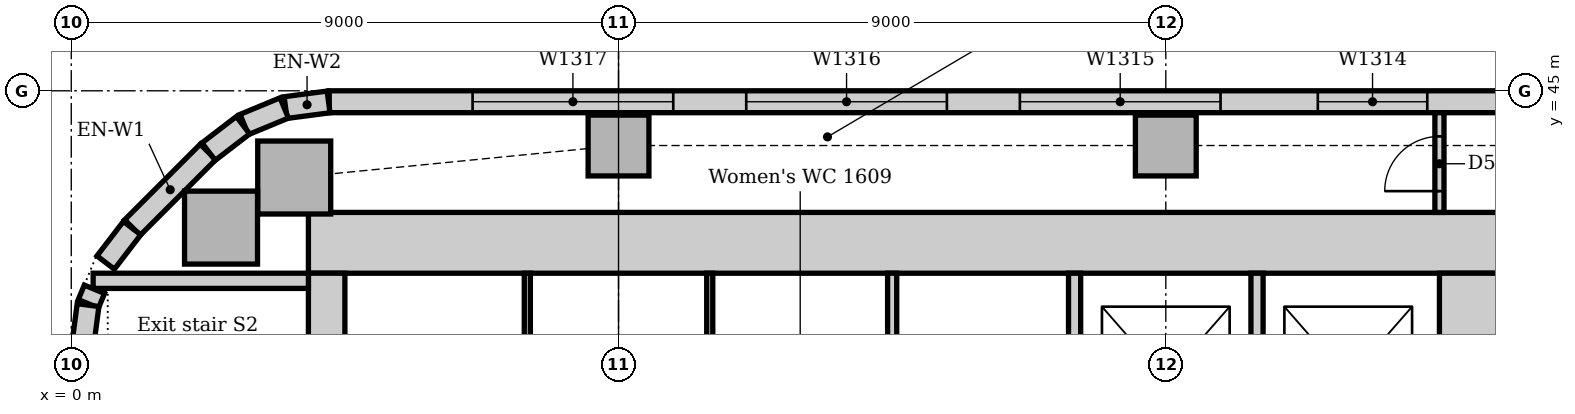
"""IFC4 building model, lengths in metres.
Left out: names, types, materials, properties, quantities, classifications, styles, units other than length and angle.
Written with IfcOpenShell. Run it as: python <this file> out.ifc"""

import sys

from ifc_helpers import new_model, si_unit, direction, frame, frame_2d, origin, origin_2d, place, context, subcontext, project, spatial, rectangle, extrude, element, fill, save


model = new_model("IFC4")
c1 = context("Model", 3, precision=1e-05, world=origin(), true_north=direction((0.0, 1.0)))
c2 = subcontext(c1, "Body", "Model", "MODEL_VIEW")
j1 = project(units=[si_unit("LENGTHUNIT", "METRE"), si_unit("PLANEANGLEUNIT", "RADIAN")], contexts=[c1])
p1 = place(None, origin())
s1 = spatial("IfcSite", under=j1, at=p1, CompositionType="ELEMENT")
p2 = place(p1, origin())
s2 = spatial("IfcBuilding", under=s1, at=p2, CompositionType="ELEMENT")
p3 = place(p2, frame((0.0, 0.0, 71.0)))
s3 = spatial("IfcBuildingStorey", under=s2, at=p3, CompositionType="ELEMENT", Elevation=71.0)
p4 = place(p3, frame((23.5, 42.5, 0.0), z_axis=(0.0, 0.0, 1.0), x_axis=(-1.0, 0.0, 0.0)))
e1 = element("IfcWall", 1, at=p4, inside=s3, PredefinedType="SOLIDWALL", context=c2, shape_type="SweptSolid", body=[
    extrude(rectangle(XDim=19.6, YDim=1.0, at=frame_2d((9.8, 0.0))), origin(), (0.0, 0.0, 1.0), 4.0),
])
p5 = place(p3, frame((23.0, 31.5, 0.0), z_axis=(0.0, 0.0, 1.0), x_axis=(0.0, 1.0, 0.0)))
e2 = element("IfcWall", 2, at=p5, inside=s3, PredefinedType="SOLIDWALL", context=c2, shape_type="SweptSolid", body=[
    extrude(rectangle(XDim=10.5, YDim=1.0, at=frame_2d((5.25, 0.0))), origin(), (0.0, 0.0, 1.0), 4.0),
])
p6 = place(p5, frame((3.15, 0.0, 0.0)))
e3 = element("IfcOpeningElement", 3, at=p6, cuts=e2, PredefinedType="OPENING", context=c2, shape_type="SweptSolid", body=[
    extrude(rectangle(XDim=1.0, YDim=2.1, at=frame_2d((0.5, 1.05))), frame((0.0, 0.51, 0.0), z_axis=(0.0, -1.0, 0.0), x_axis=(1.0, 0.0, 0.0)), (0.0, 0.0, 1.0), 1.02),
])
p7 = place(p5, frame((5.2, 0.0, 0.0)))
e4 = element("IfcOpeningElement", 4, at=p7, cuts=e2, PredefinedType="OPENING", context=c2, shape_type="SweptSolid", body=[
    extrude(rectangle(XDim=1.0, YDim=2.1, at=frame_2d((0.5, 1.05))), frame((0.0, 0.51, 0.0), z_axis=(0.0, -1.0, 0.0), x_axis=(1.0, 0.0, 0.0)), (0.0, 0.0, 1.0), 1.02),
])
p8 = place(p3, frame((4.2, 42.0, 0.0), z_axis=(0.0, 0.0, 1.0), x_axis=(0.0, -1.0, 0.0)))
e5 = element("IfcWall", 5, at=p8, inside=s3, PredefinedType="SOLIDWALL", context=c2, shape_type="SweptSolid", body=[
    extrude(rectangle(XDim=10.5, YDim=0.6, at=frame_2d((5.25, 0.0))), origin(), (0.0, 0.0, 1.0), 4.0),
])
p9 = place(p8, frame((5.3, 0.0, 0.0)))
e6 = element("IfcOpeningElement", 6, at=p9, cuts=e5, PredefinedType="OPENING", context=c2, shape_type="SweptSolid", body=[
    extrude(rectangle(XDim=1.0, YDim=2.1, at=frame_2d((0.5, 1.05))), frame((0.0, 0.31, 0.0), z_axis=(0.0, -1.0, 0.0), x_axis=(1.0, 0.0, 0.0)), (0.0, 0.0, 1.0), 0.62),
])
p10 = place(p3, frame((3.9, 41.875, 0.0), z_axis=(0.0, 0.0, 1.0), x_axis=(-1.0, 0.0, 0.0)))
e7 = element("IfcWall", 7, at=p10, inside=s3, PredefinedType="SOLIDWALL", context=c2, shape_type="SweptSolid", body=[
    extrude(rectangle(XDim=3.54, YDim=0.25, at=frame_2d((1.77, 0.0))), origin(), (0.0, 0.0, 1.0), 4.0),
])
for number, where, z_axis, x_axis in (
    (8, (3.667, 43.574, 0.0), (0.0, 0.0, 1.0), (1.0, 0.0, 0.0)),
    (9, (2.463, 42.75, 0.0), (0.0, 0.0, 1.0), (1.0, 0.0, 0.0)),
):
    element("IfcColumn", number, at=place(p3, frame(where, z_axis=z_axis, x_axis=x_axis)), inside=s3, PredefinedType="COLUMN", context=c2, shape_type="SweptSolid", body=[
        extrude(rectangle(XDim=1.2, YDim=1.2, at=origin_2d()), origin(), (0.0, 0.0, 1.0), 3.85),
    ])
for number, where, z_axis, x_axis in (
    (10, (9.0, 44.1, 0.0), (0.0, 0.0, 1.0), (1.0, 0.0, 0.0)),
    (11, (18.0, 44.1, 0.0), (0.0, 0.0, 1.0), (1.0, 0.0, 0.0)),
):
    element("IfcColumn", number, at=place(p3, frame(where, z_axis=z_axis, x_axis=x_axis)), inside=s3, PredefinedType="COLUMN", context=c2, shape_type="SweptSolid", body=[
        extrude(rectangle(XDim=1.0, YDim=1.0, at=origin_2d()), origin(), (0.0, 0.0, 1.0), 3.85),
    ])
p11 = place(p3, frame((48.257, 44.82, 0.0), z_axis=(0.0, 0.0, 1.0), x_axis=(-1.0, 0.0, 0.0)))
e12 = element("IfcWall", 12, at=p11, inside=s3, PredefinedType="STANDARD", context=c2, shape_type="SweptSolid", body=[
    extrude(rectangle(XDim=44.015, YDim=0.36, at=frame_2d((22.007, 0.0))), origin(), (0.0, 0.0, 1.0), 3.85),
])
p12 = place(p11, frame((2.057, 0.0, 0.9)))
e13 = element("IfcOpeningElement", 13, at=p12, cuts=e12, PredefinedType="OPENING", context=c2, shape_type="SweptSolid", body=[
    extrude(rectangle(XDim=3.3, YDim=1.6, at=frame_2d((1.65, 0.8))), frame((0.0, 0.19, 0.0), z_axis=(0.0, -1.0, 0.0), x_axis=(1.0, 0.0, 0.0)), (0.0, 0.0, 1.0), 0.38),
])
p13 = place(p11, frame((6.857, 0.0, 0.9)))
e14 = element("IfcOpeningElement", 14, at=p13, cuts=e12, PredefinedType="OPENING", context=c2, shape_type="SweptSolid", body=[
    extrude(rectangle(XDim=3.3, YDim=1.6, at=frame_2d((1.65, 0.8))), frame((0.0, 0.19, 0.0), z_axis=(0.0, -1.0, 0.0), x_axis=(1.0, 0.0, 0.0)), (0.0, 0.0, 1.0), 0.38),
])
p14 = place(p11, frame((11.357, 0.0, 0.9)))
e15 = element("IfcOpeningElement", 15, at=p14, cuts=e12, PredefinedType="OPENING", context=c2, shape_type="SweptSolid", body=[
    extrude(rectangle(XDim=3.3, YDim=1.6, at=frame_2d((1.65, 0.8))), frame((0.0, 0.19, 0.0), z_axis=(0.0, -1.0, 0.0), x_axis=(1.0, 0.0, 0.0)), (0.0, 0.0, 1.0), 0.38),
])
p15 = place(p11, frame((15.857, 0.0, 0.9)))
e16 = element("IfcOpeningElement", 16, at=p15, cuts=e12, PredefinedType="OPENING", context=c2, shape_type="SweptSolid", body=[
    extrude(rectangle(XDim=3.3, YDim=1.6, at=frame_2d((1.65, 0.8))), frame((0.0, 0.19, 0.0), z_axis=(0.0, -1.0, 0.0), x_axis=(1.0, 0.0, 0.0)), (0.0, 0.0, 1.0), 0.38),
])
p16 = place(p11, frame((20.357, 0.0, 0.9)))
e17 = element("IfcOpeningElement", 17, at=p16, cuts=e12, PredefinedType="OPENING", context=c2, shape_type="SweptSolid", body=[
    extrude(rectangle(XDim=3.3, YDim=1.6, at=frame_2d((1.65, 0.8))), frame((0.0, 0.19, 0.0), z_axis=(0.0, -1.0, 0.0), x_axis=(1.0, 0.0, 0.0)), (0.0, 0.0, 1.0), 0.38),
])
p17 = place(p11, frame((25.957, 0.0, 0.9)))
e18 = element("IfcOpeningElement", 18, at=p17, cuts=e12, PredefinedType="OPENING", context=c2, shape_type="SweptSolid", body=[
    extrude(rectangle(XDim=1.8, YDim=1.6, at=frame_2d((0.9, 0.8))), frame((0.0, 0.19, 0.0), z_axis=(0.0, -1.0, 0.0), x_axis=(1.0, 0.0, 0.0)), (0.0, 0.0, 1.0), 0.38),
])
p18 = place(p11, frame((29.357, 0.0, 0.9)))
e19 = element("IfcOpeningElement", 19, at=p18, cuts=e12, PredefinedType="OPENING", context=c2, shape_type="SweptSolid", body=[
    extrude(rectangle(XDim=3.3, YDim=1.6, at=frame_2d((1.65, 0.8))), frame((0.0, 0.19, 0.0), z_axis=(0.0, -1.0, 0.0), x_axis=(1.0, 0.0, 0.0)), (0.0, 0.0, 1.0), 0.38),
])
p19 = place(p11, frame((33.857, 0.0, 0.9)))
e20 = element("IfcOpeningElement", 20, at=p19, cuts=e12, PredefinedType="OPENING", context=c2, shape_type="SweptSolid", body=[
    extrude(rectangle(XDim=3.3, YDim=1.6, at=frame_2d((1.65, 0.8))), frame((0.0, 0.19, 0.0), z_axis=(0.0, -1.0, 0.0), x_axis=(1.0, 0.0, 0.0)), (0.0, 0.0, 1.0), 0.38),
])
p20 = place(p11, frame((38.357, 0.0, 0.9)))
e21 = element("IfcOpeningElement", 21, at=p20, cuts=e12, PredefinedType="OPENING", context=c2, shape_type="SweptSolid", body=[
    extrude(rectangle(XDim=3.3, YDim=1.6, at=frame_2d((1.65, 0.8))), frame((0.0, 0.19, 0.0), z_axis=(0.0, -1.0, 0.0), x_axis=(1.0, 0.0, 0.0)), (0.0, 0.0, 1.0), 0.38),
])
p21 = place(p3, frame((2.249, 43.994, 0.0), z_axis=(0.0, 0.0, 1.0), x_axis=(-0.707106781187, -0.707106781187, 0.0)))
e22 = element("IfcWall", 22, at=p21, inside=s3, PredefinedType="STANDARD", context=c2, shape_type="SweptSolid", body=[
    extrude(rectangle(XDim=1.757, YDim=0.36, at=frame_2d((0.879, 0.0))), origin(), (0.0, 0.0, 1.0), 3.85),
])
for number, where, z_axis, x_axis in (
    (23, (4.231, 44.817, 0.0), (0.0, 0.0, 1.0), (-0.991, -0.131, 0.0)),
    (24, (3.503, 44.718, 0.0), (0.0, 0.0, 1.0), (-0.924, -0.383, 0.0)),
):
    element("IfcWall", number, at=place(p3, frame(where, z_axis=z_axis, x_axis=x_axis)), inside=s3, PredefinedType="STANDARD", context=c2, shape_type="SweptSolid", body=[
        extrude(rectangle(XDim=0.713, YDim=0.36, at=frame_2d((0.356, 0.0))), origin(), (0.0, 0.0, 1.0), 3.85),
    ])
for number, where, z_axis, x_axis in (
    (25, (2.825, 44.434, 0.0), (0.0, 0.0, 1.0), (-0.793, -0.609, 0.0)),
    (26, (1.0, 42.741, 0.0), (0.0, 0.0, 1.0), (-0.609, -0.793, 0.0)),
):
    element("IfcWall", number, at=place(p3, frame(where, z_axis=z_axis, x_axis=x_axis)), inside=s3, PredefinedType="STANDARD", context=c2, shape_type="SweptSolid", body=[
        extrude(rectangle(XDim=0.713, YDim=0.36, at=frame_2d((0.357, 0.0))), origin(), (0.0, 0.0, 1.0), 3.85),
    ])
p22 = place(p3, frame((0.381, 41.736, 0.0), z_axis=(0.0, 0.0, 1.0), x_axis=(-0.382773360986, -0.923842277729, 0.0)))
e27 = element("IfcWall", 27, at=p22, inside=s3, PredefinedType="STANDARD", context=c2, shape_type="SweptSolid", body=[
    extrude(rectangle(XDim=0.258, YDim=0.36, at=frame_2d((0.129, 0.0))), origin(), (0.0, 0.0, 1.0), 3.85),
])
p23 = place(p3, frame((0.276, 41.476, 0.0), z_axis=(0.0, 0.0, 1.0), x_axis=(-0.13055608231, -0.99144092581, 0.0)))
e28 = element("IfcWall", 28, at=p23, inside=s3, PredefinedType="STANDARD", context=c2, shape_type="SweptSolid", body=[
    extrude(rectangle(XDim=0.713, YDim=0.36, at=frame_2d((0.356, 0.0))), origin(), (0.0, 0.0, 1.0), 3.85),
])
for number, where, z_axis, x_axis in (
    (29, (16.5, 38.6, 0.0), (0.0, 0.0, 1.0), (0.0, 1.0, 0.0)),
    (30, (19.5, 38.6, 0.0), (0.0, 0.0, 1.0), (0.0, 1.0, 0.0)),
):
    element("IfcWall", number, at=place(p3, frame(where, z_axis=z_axis, x_axis=x_axis)), inside=s3, PredefinedType="PARTITIONING", context=c2, shape_type="SweptSolid", body=[
        extrude(rectangle(XDim=3.4, YDim=0.2, at=frame_2d((1.7, 0.0))), origin(), (0.0, 0.0, 1.0), 3.85),
    ])
p24 = place(p3, frame((22.5, 43.0, 0.0), z_axis=(0.0, 0.0, 1.0), x_axis=(0.0, 1.0, 0.0)))
e31 = element("IfcWall", 31, at=p24, inside=s3, PredefinedType="PARTITIONING", context=c2, shape_type="SweptSolid", body=[
    extrude(rectangle(XDim=1.64, YDim=0.15, at=frame_2d((0.82, 0.0))), origin(), (0.0, 0.0, 1.0), 3.85),
])
p25 = place(p24, frame((0.35, 0.0, 0.0)))
e32 = element("IfcOpeningElement", 32, at=p25, cuts=e31, PredefinedType="OPENING", context=c2, shape_type="SweptSolid", body=[
    extrude(rectangle(XDim=0.9, YDim=2.1, at=frame_2d((0.45, 1.05))), frame((0.0, 0.085, 0.0), z_axis=(0.0, -1.0, 0.0), x_axis=(1.0, 0.0, 0.0)), (0.0, 0.0, 1.0), 0.17),
])
p26 = place(p3, frame((13.5, 38.575, 0.0), z_axis=(0.0, 0.0, 1.0), x_axis=(0.0, 1.0, 0.0)))
e33 = element("IfcWall", 33, at=p26, inside=s3, PredefinedType="PARTITIONING", context=c2, shape_type="SweptSolid", body=[
    extrude(rectangle(XDim=3.425, YDim=0.15, at=frame_2d((1.712, 0.0))), origin(), (0.0, 0.0, 1.0), 3.85),
])
for number, where, z_axis, x_axis in (
    (34, (7.5, 38.575, 0.0), (0.0, 0.0, 1.0), (0.0, 1.0, 0.0)),
    (35, (10.5, 38.575, 0.0), (0.0, 0.0, 1.0), (0.0, 1.0, 0.0)),
):
    element("IfcWall", number, at=place(p3, frame(where, z_axis=z_axis, x_axis=x_axis)), inside=s3, PredefinedType="PARTITIONING", context=c2, shape_type="SweptSolid", body=[
        extrude(rectangle(XDim=3.425, YDim=0.1, at=frame_2d((1.712, 0.0))), origin(), (0.0, 0.0, 1.0), 3.85),
    ])
p27 = place(p17, origin())
e36 = element("IfcWindow", 36, at=p27, inside=s3, PartitioningType="SINGLE_PANEL", PredefinedType="WINDOW", context=c2, shape_type="SweptSolid", body=[
    extrude(rectangle(XDim=1.8, YDim=1.6, at=frame_2d((0.9, 0.8))), frame((0.0, 0.13, 0.0), z_axis=(0.0, -1.0, 0.0), x_axis=(1.0, 0.0, 0.0)), (0.0, 0.0, 1.0), 0.06),
])
fill(e18, e36)
p28 = place(p18, origin())
e37 = element("IfcWindow", 37, at=p28, inside=s3, PartitioningType="SINGLE_PANEL", PredefinedType="WINDOW", context=c2, shape_type="SweptSolid", body=[
    extrude(rectangle(XDim=3.3, YDim=1.6, at=frame_2d((1.65, 0.8))), frame((0.0, 0.13, 0.0), z_axis=(0.0, -1.0, 0.0), x_axis=(1.0, 0.0, 0.0)), (0.0, 0.0, 1.0), 0.06),
])
fill(e19, e37)
p29 = place(p19, origin())
e38 = element("IfcWindow", 38, at=p29, inside=s3, PartitioningType="SINGLE_PANEL", PredefinedType="WINDOW", context=c2, shape_type="SweptSolid", body=[
    extrude(rectangle(XDim=3.3, YDim=1.6, at=frame_2d((1.65, 0.8))), frame((0.0, 0.13, 0.0), z_axis=(0.0, -1.0, 0.0), x_axis=(1.0, 0.0, 0.0)), (0.0, 0.0, 1.0), 0.06),
])
fill(e20, e38)
p30 = place(p20, origin())
e39 = element("IfcWindow", 39, at=p30, inside=s3, PartitioningType="SINGLE_PANEL", PredefinedType="WINDOW", context=c2, shape_type="SweptSolid", body=[
    extrude(rectangle(XDim=3.3, YDim=1.6, at=frame_2d((1.65, 0.8))), frame((0.0, 0.13, 0.0), z_axis=(0.0, -1.0, 0.0), x_axis=(1.0, 0.0, 0.0)), (0.0, 0.0, 1.0), 0.06),
])
fill(e21, e39)
p31 = place(p25, origin())
e40 = element("IfcDoor", 40, at=p31, inside=s3, OperationType="SINGLE_SWING_LEFT", PredefinedType="DOOR", context=c2, shape_type="SweptSolid", body=[
    extrude(rectangle(XDim=0.9, YDim=2.1, at=frame_2d((0.45, 1.05))), frame((0.0, 0.025, 0.0), z_axis=(0.0, -1.0, 0.0), x_axis=(1.0, 0.0, 0.0)), (0.0, 0.0, 1.0), 0.05),
])
fill(e32, e40)
save(model, sys.argv[1])
